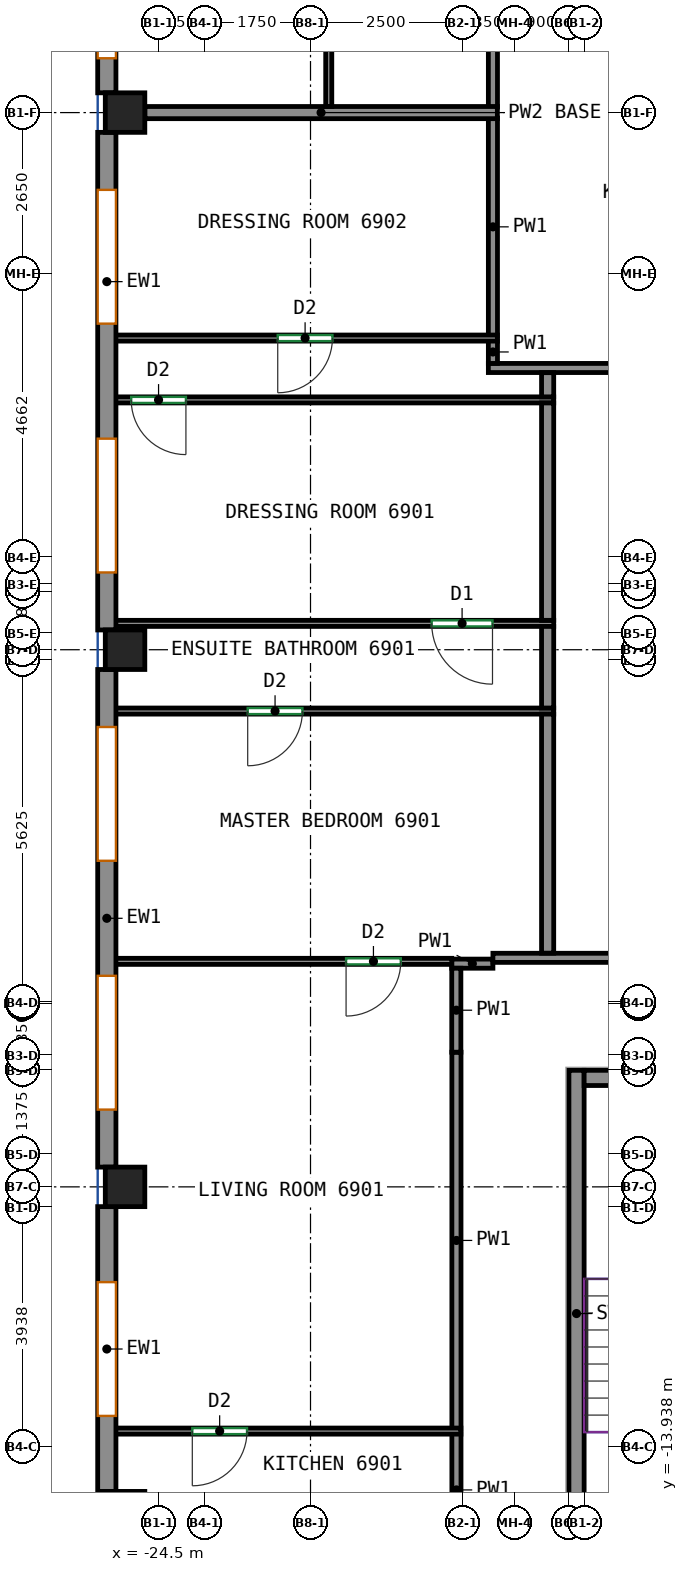
"""IFC4 building model, lengths in metres.
Left out: names, types, materials, properties, quantities, classifications, styles, units other than length and angle.
Written with IfcOpenShell. Run it as: python <this file> out.ifc"""

import sys

from ifc_helpers import new_model, si_unit, direction, frame, frame_2d, origin, origin_2d, place, context, subcontext, project, spatial, rectangle, extrude, source, transform, mapped, element, fill, save


model = new_model("IFC4")
c1 = context("Model", 3, precision=1e-05, world=origin(), true_north=direction((0.0, 1.0)))
c2 = subcontext(c1, "Body", "Model", "MODEL_VIEW")
j1 = project(units=[si_unit("LENGTHUNIT", "METRE"), si_unit("PLANEANGLEUNIT", "RADIAN")], contexts=[c1])
p1 = place(None, origin())
s1 = spatial("IfcSite", under=j1, at=p1, CompositionType="ELEMENT")
p2 = place(p1, origin())
s2 = spatial("IfcBuilding", under=s1, at=p2, CompositionType="ELEMENT")
p3 = place(p2, frame((0.0, 0.0, 280.6)))
s3 = spatial("IfcBuildingStorey", under=s2, at=p3, CompositionType="ELEMENT", Elevation=280.6)
m1 = source(origin(), c2, "Body", "SweptSolid", [
    extrude(rectangle(XDim=0.65, YDim=0.65, at=origin_2d()), origin(), (0.0, 0.0, 1.0), 3.12),
])
for number, where, z_axis, x_axis in (
    (1, (-25.05, -15.0, 0.0), (0.0, 0.0, 1.0), (1.0, 0.0, 0.0)),
    (2, (-25.05, -9.667, 0.0), (0.0, 0.0, 1.0), (1.0, 0.0, 0.0)),
    (3, (-25.05, -0.833, 0.0), (0.0, 0.0, 1.0), (1.0, 0.0, 0.0)),
    (4, (-25.05, 8.0, 0.0), (0.0, 0.0, 1.0), (1.0, 0.0, 0.0)),
):
    element("IfcColumn", number, at=place(p3, frame(where, z_axis=z_axis, x_axis=x_axis)), inside=s3, PredefinedType="COLUMN", context=c2, shape_type="MappedRepresentation", body=[
        mapped(m1, transform((0.0, 0.0, 0.0))),
    ])
m2 = source(origin(), c2, "Body", "SweptSolid", [
    extrude(rectangle(XDim=8.0, YDim=0.25, at=frame_2d((4.0, 0.0))), origin(), (0.0, 0.0, 1.0), 3.12),
])
p4 = place(p3, frame((-17.625, -15.75, 0.0), z_axis=(0.0, 0.0, 1.0), x_axis=(0.0, 1.0, 0.0)))
e5 = element("IfcWall", 5, at=p4, inside=s3, PredefinedType="SHEAR", context=c2, shape_type="MappedRepresentation", body=[
    mapped(m2, transform((0.0, 0.0, 0.0))),
])
m3 = source(origin(), c2, "Body", "SweptSolid", [
    extrude(rectangle(XDim=3.7, YDim=0.25, at=frame_2d((1.85, 0.0))), origin(), (0.0, 0.0, 1.0), 3.12),
])
p5 = place(p3, frame((-17.5, -7.875, 0.0), z_axis=(0.0, 0.0, 1.0), x_axis=(1.0, 0.0, 0.0)))
e6 = element("IfcWall", 6, at=p5, inside=s3, PredefinedType="SHEAR", context=c2, shape_type="MappedRepresentation", body=[
    mapped(m3, transform((0.0, 0.0, 0.0))),
])
m4 = source(origin(), c2, "Body", "SweptSolid", [
    extrude(rectangle(XDim=13.35, YDim=0.3, at=frame_2d((6.675, 0.0))), origin(), (0.0, 0.0, 1.0), 3.12),
])
p6 = place(p3, frame((-25.35, 21.675, 0.0), z_axis=(0.0, 0.0, 1.0), x_axis=(0.0, -1.0, 0.0)))
e7 = element("IfcWall", 7, at=p6, inside=s3, PredefinedType="SOLIDWALL", context=c2, shape_type="MappedRepresentation", body=[
    mapped(m4, transform((0.0, 0.0, 0.0))),
])
p7 = place(p6, frame((0.569, 0.0, 0.8)))
e8 = element("IfcOpeningElement", 8, at=p7, cuts=e7, PredefinedType="OPENING", context=c2, shape_type="SweptSolid", body=[
    extrude(rectangle(XDim=2.2, YDim=2.05, at=frame_2d((1.1, 1.025))), frame((0.0, 0.16, 0.0), z_axis=(0.0, -1.0, 0.0), x_axis=(1.0, 0.0, 0.0)), (0.0, 0.0, 1.0), 0.32),
])
p8 = place(p6, frame((3.906, 0.0, 0.8)))
e9 = element("IfcOpeningElement", 9, at=p8, cuts=e7, PredefinedType="OPENING", context=c2, shape_type="SweptSolid", body=[
    extrude(rectangle(XDim=2.2, YDim=2.05, at=frame_2d((1.1, 1.025))), frame((0.0, 0.16, 0.0), z_axis=(0.0, -1.0, 0.0), x_axis=(1.0, 0.0, 0.0)), (0.0, 0.0, 1.0), 0.32),
])
p9 = place(p6, frame((7.244, 0.0, 0.8)))
e10 = element("IfcOpeningElement", 10, at=p9, cuts=e7, PredefinedType="OPENING", context=c2, shape_type="SweptSolid", body=[
    extrude(rectangle(XDim=2.2, YDim=2.05, at=frame_2d((1.1, 1.025))), frame((0.0, 0.16, 0.0), z_axis=(0.0, -1.0, 0.0), x_axis=(1.0, 0.0, 0.0)), (0.0, 0.0, 1.0), 0.32),
])
p10 = place(p6, frame((10.581, 0.0, 0.8)))
e11 = element("IfcOpeningElement", 11, at=p10, cuts=e7, PredefinedType="OPENING", context=c2, shape_type="SweptSolid", body=[
    extrude(rectangle(XDim=2.2, YDim=2.05, at=frame_2d((1.1, 1.025))), frame((0.0, 0.16, 0.0), z_axis=(0.0, -1.0, 0.0), x_axis=(1.0, 0.0, 0.0)), (0.0, 0.0, 1.0), 0.32),
])
m5 = source(origin(), c2, "Body", "SweptSolid", [
    extrude(rectangle(XDim=8.183, YDim=0.3, at=frame_2d((4.092, 0.0))), origin(), (0.0, 0.0, 1.0), 3.12),
])
p11 = place(p3, frame((-25.35, 7.675, 0.0), z_axis=(0.0, 0.0, 1.0), x_axis=(0.0, -1.0, 0.0)))
e12 = element("IfcWall", 12, at=p11, inside=s3, PredefinedType="SOLIDWALL", context=c2, shape_type="MappedRepresentation", body=[
    mapped(m5, transform((0.0, 0.0, 0.0))),
])
p12 = place(p11, frame((0.946, 0.0, 0.8)))
e13 = element("IfcOpeningElement", 13, at=p12, cuts=e12, PredefinedType="OPENING", context=c2, shape_type="SweptSolid", body=[
    extrude(rectangle(XDim=2.2, YDim=2.05, at=frame_2d((1.1, 1.025))), frame((0.0, 0.16, 0.0), z_axis=(0.0, -1.0, 0.0), x_axis=(1.0, 0.0, 0.0)), (0.0, 0.0, 1.0), 0.32),
])
p13 = place(p11, frame((5.037, 0.0, 0.8)))
e14 = element("IfcOpeningElement", 14, at=p13, cuts=e12, PredefinedType="OPENING", context=c2, shape_type="SweptSolid", body=[
    extrude(rectangle(XDim=2.2, YDim=2.05, at=frame_2d((1.1, 1.025))), frame((0.0, 0.16, 0.0), z_axis=(0.0, -1.0, 0.0), x_axis=(1.0, 0.0, 0.0)), (0.0, 0.0, 1.0), 0.32),
])
m6 = source(origin(), c2, "Body", "SweptSolid", [
    extrude(rectangle(XDim=8.184, YDim=0.3, at=frame_2d((4.092, 0.0))), origin(), (0.0, 0.0, 1.0), 3.12),
])
p14 = place(p3, frame((-25.35, -1.158, 0.0), z_axis=(0.0, 0.0, 1.0), x_axis=(0.0, -1.0, 0.0)))
e15 = element("IfcWall", 15, at=p14, inside=s3, PredefinedType="SOLIDWALL", context=c2, shape_type="MappedRepresentation", body=[
    mapped(m6, transform((0.0, 0.0, 0.0))),
])
p15 = place(p14, frame((0.946, 0.0, 0.8)))
e16 = element("IfcOpeningElement", 16, at=p15, cuts=e15, PredefinedType="OPENING", context=c2, shape_type="SweptSolid", body=[
    extrude(rectangle(XDim=2.2, YDim=2.05, at=frame_2d((1.1, 1.025))), frame((0.0, 0.16, 0.0), z_axis=(0.0, -1.0, 0.0), x_axis=(1.0, 0.0, 0.0)), (0.0, 0.0, 1.0), 0.32),
])
p16 = place(p14, frame((5.038, 0.0, 0.8)))
e17 = element("IfcOpeningElement", 17, at=p16, cuts=e15, PredefinedType="OPENING", context=c2, shape_type="SweptSolid", body=[
    extrude(rectangle(XDim=2.2, YDim=2.05, at=frame_2d((1.1, 1.025))), frame((0.0, 0.16, 0.0), z_axis=(0.0, -1.0, 0.0), x_axis=(1.0, 0.0, 0.0)), (0.0, 0.0, 1.0), 0.32),
])
m7 = source(origin(), c2, "Body", "SweptSolid", [
    extrude(rectangle(XDim=4.683, YDim=0.3, at=frame_2d((2.342, 0.0))), origin(), (0.0, 0.0, 1.0), 3.12),
])
p17 = place(p3, frame((-25.35, -9.992, 0.0), z_axis=(0.0, 0.0, 1.0), x_axis=(0.0, -1.0, 0.0)))
e18 = element("IfcWall", 18, at=p17, inside=s3, PredefinedType="SOLIDWALL", context=c2, shape_type="MappedRepresentation", body=[
    mapped(m7, transform((0.0, 0.0, 0.0))),
])
p18 = place(p17, frame((1.242, 0.0, 0.8)))
e19 = element("IfcOpeningElement", 19, at=p18, cuts=e18, PredefinedType="OPENING", context=c2, shape_type="SweptSolid", body=[
    extrude(rectangle(XDim=2.2, YDim=2.05, at=frame_2d((1.1, 1.025))), frame((0.0, 0.16, 0.0), z_axis=(0.0, -1.0, 0.0), x_axis=(1.0, 0.0, 0.0)), (0.0, 0.0, 1.0), 0.32),
])
p19 = place(p3, frame((-19.6, -15.578, 0.0), z_axis=(0.0, 0.0, 1.0), x_axis=(0.0, 1.0, 0.0)))
e20 = element("IfcWall", 20, at=p19, inside=s3, PredefinedType="PARTITIONING", context=c2, shape_type="SweptSolid", body=[
    extrude(rectangle(XDim=1.855, YDim=0.15, at=frame_2d((0.927, 0.0))), origin(), (0.0, 0.0, 1.0), 3.12),
])
p20 = place(p3, frame((-19.0, -5.996, 0.0), z_axis=(0.0, 0.0, 1.0), x_axis=(-1.0, 0.0, 0.0)))
e21 = element("IfcWall", 21, at=p20, inside=s3, PredefinedType="PARTITIONING", context=c2, shape_type="SweptSolid", body=[
    extrude(rectangle(XDim=0.677, YDim=0.15, at=frame_2d((0.338, 0.0))), origin(), (0.0, 0.0, 1.0), 3.12),
])
p21 = place(p3, frame((-19.6, -13.643, 0.0), z_axis=(0.0, 0.0, 1.0), x_axis=(0.0, 1.0, 0.0)))
e22 = element("IfcWall", 22, at=p21, inside=s3, PredefinedType="PARTITIONING", context=c2, shape_type="SweptSolid", body=[
    extrude(rectangle(XDim=6.191, YDim=0.15, at=frame_2d((3.096, 0.0))), origin(), (0.0, 0.0, 1.0), 3.12),
])
p22 = place(p3, frame((-19.602, -7.452, 0.0), z_axis=(0.0, 0.0, 1.0), x_axis=(0.0, 1.0, 0.0)))
e23 = element("IfcWall", 23, at=p22, inside=s3, PredefinedType="PARTITIONING", context=c2, shape_type="SweptSolid", body=[
    extrude(rectangle(XDim=1.381, YDim=0.15, at=frame_2d((0.69, 0.0))), origin(), (0.0, 0.0, 1.0), 3.12),
])
p23 = place(p3, frame((-19.0, -5.9, 0.0), z_axis=(0.0, 0.0, 1.0), x_axis=(1.0, 0.0, 0.0)))
e24 = element("IfcWall", 24, at=p23, inside=s3, PredefinedType="PARTITIONING", context=c2, shape_type="SweptSolid", body=[
    extrude(rectangle(XDim=25.655, YDim=0.15, at=frame_2d((12.828, 0.0))), origin(), (0.0, 0.0, 1.0), 3.12),
])
p24 = place(p23, frame((4.394, 0.0, 0.0)))
e25 = element("IfcOpeningElement", 25, at=p24, cuts=e24, PredefinedType="OPENING", context=c2, shape_type="SweptSolid", body=[
    extrude(rectangle(XDim=0.9, YDim=2.1, at=frame_2d((0.45, 1.05))), frame((0.0, 0.085, 0.0), z_axis=(0.0, -1.0, 0.0), x_axis=(1.0, 0.0, 0.0)), (0.0, 0.0, 1.0), 0.17),
])
p25 = place(p3, frame((-19.075, 3.8, 0.0), z_axis=(0.0, 0.0, 1.0), x_axis=(1.0, 0.0, 0.0)))
e26 = element("IfcWall", 26, at=p25, inside=s3, PredefinedType="PARTITIONING", context=c2, shape_type="SweptSolid", body=[
    extrude(rectangle(XDim=4.89, YDim=0.15, at=frame_2d((2.445, 0.0))), origin(), (0.0, 0.0, 1.0), 3.12),
])
p26 = place(p3, frame((-19.0, 3.875, 0.0), z_axis=(0.0, 0.0, 1.0), x_axis=(0.0, 1.0, 0.0)))
e27 = element("IfcWall", 27, at=p26, inside=s3, PredefinedType="PARTITIONING", context=c2, shape_type="SweptSolid", body=[
    extrude(rectangle(XDim=0.377, YDim=0.15, at=frame_2d((0.188, 0.0))), origin(), (0.0, 0.0, 1.0), 3.12),
])
p27 = place(p3, frame((-19.0, 4.332, 0.0), z_axis=(0.0, 0.0, 1.0), x_axis=(0.0, 1.0, 0.0)))
e28 = element("IfcWall", 28, at=p27, inside=s3, PredefinedType="PARTITIONING", context=c2, shape_type="SweptSolid", body=[
    extrude(rectangle(XDim=3.578, YDim=0.15, at=frame_2d((1.789, 0.0))), origin(), (0.0, 0.0, 1.0), 3.12),
])
p28 = place(p3, frame((-19.0, 8.09, 0.0), z_axis=(0.0, 0.0, 1.0), x_axis=(0.0, 1.0, 0.0)))
e29 = element("IfcWall", 29, at=p28, inside=s3, PredefinedType="PARTITIONING", context=c2, shape_type="SweptSolid", body=[
    extrude(rectangle(XDim=9.67, YDim=0.15, at=frame_2d((4.835, 0.0))), origin(), (0.0, 0.0, 1.0), 3.12),
])
p29 = place(p28, frame((3.629, 0.0, 0.0)))
e30 = element("IfcOpeningElement", 30, at=p29, cuts=e29, PredefinedType="OPENING", context=c2, shape_type="SweptSolid", body=[
    extrude(rectangle(XDim=1.0, YDim=2.1, at=frame_2d((0.5, 1.05))), frame((0.0, 0.085, 0.0), z_axis=(0.0, -1.0, 0.0), x_axis=(1.0, 0.0, 0.0)), (0.0, 0.0, 1.0), 0.17),
])
p30 = place(p3, frame((-19.527, -13.683, 0.0), z_axis=(0.0, 0.0, 1.0), x_axis=(-1.0, 0.0, 0.0)))
e31 = element("IfcWall", 31, at=p30, inside=s3, PredefinedType="PARTITIONING", context=c2, shape_type="SweptSolid", body=[
    extrude(rectangle(XDim=5.723, YDim=0.1, at=frame_2d((2.861, 0.0))), origin(), (0.0, 0.0, 1.0), 3.12),
])
p31 = place(p30, frame((3.517, 0.0, 0.0)))
e32 = element("IfcOpeningElement", 32, at=p31, cuts=e31, PredefinedType="OPENING", context=c2, shape_type="SweptSolid", body=[
    extrude(rectangle(XDim=0.9, YDim=2.1, at=frame_2d((0.45, 1.05))), frame((0.0, 0.06, 0.0), z_axis=(0.0, -1.0, 0.0), x_axis=(1.0, 0.0, 0.0)), (0.0, 0.0, 1.0), 0.12),
])
p32 = place(p3, frame((-19.677, -5.958, 0.0), z_axis=(0.0, 0.0, 1.0), x_axis=(-1.0, 0.0, 0.0)))
e33 = element("IfcWall", 33, at=p32, inside=s3, PredefinedType="PARTITIONING", context=c2, shape_type="SweptSolid", body=[
    extrude(rectangle(XDim=5.573, YDim=0.1, at=frame_2d((2.787, 0.0))), origin(), (0.0, 0.0, 1.0), 3.12),
])
p33 = place(p32, frame((0.838, 0.0, 0.0)))
e34 = element("IfcOpeningElement", 34, at=p33, cuts=e33, PredefinedType="OPENING", context=c2, shape_type="SweptSolid", body=[
    extrude(rectangle(XDim=0.9, YDim=2.1, at=frame_2d((0.45, 1.05))), frame((0.0, 0.06, 0.0), z_axis=(0.0, -1.0, 0.0), x_axis=(1.0, 0.0, 0.0)), (0.0, 0.0, 1.0), 0.12),
])
p34 = place(p3, frame((-18.0, -1.842, 0.0), z_axis=(0.0, 0.0, 1.0), x_axis=(-1.0, 0.0, 0.0)))
e35 = element("IfcWall", 35, at=p34, inside=s3, PredefinedType="PARTITIONING", context=c2, shape_type="SweptSolid", body=[
    extrude(rectangle(XDim=7.25, YDim=0.1, at=frame_2d((3.625, 0.0))), origin(), (0.0, 0.0, 1.0), 3.12),
])
p35 = place(p34, frame((4.133, 0.0, 0.0)))
e36 = element("IfcOpeningElement", 36, at=p35, cuts=e35, PredefinedType="OPENING", context=c2, shape_type="SweptSolid", body=[
    extrude(rectangle(XDim=0.9, YDim=2.1, at=frame_2d((0.45, 1.05))), frame((0.0, 0.06, 0.0), z_axis=(0.0, -1.0, 0.0), x_axis=(1.0, 0.0, 0.0)), (0.0, 0.0, 1.0), 0.12),
])
p36 = place(p3, frame((-18.1, -5.823, 0.0), z_axis=(0.0, 0.0, 1.0), x_axis=(0.0, 1.0, 0.0)))
e37 = element("IfcWall", 37, at=p36, inside=s3, PredefinedType="PARTITIONING", context=c2, shape_type="SweptSolid", body=[
    extrude(rectangle(XDim=3.931, YDim=0.2, at=frame_2d((1.965, 0.0))), origin(), (0.0, 0.0, 1.0), 3.12),
])
p37 = place(p3, frame((-18.0, -0.4, 0.0), z_axis=(0.0, 0.0, 1.0), x_axis=(-1.0, 0.0, 0.0)))
e38 = element("IfcWall", 38, at=p37, inside=s3, PredefinedType="PARTITIONING", context=c2, shape_type="SweptSolid", body=[
    extrude(rectangle(XDim=7.25, YDim=0.1, at=frame_2d((3.625, 0.0))), origin(), (0.0, 0.0, 1.0), 3.12),
])
p38 = place(p37, frame((1.007, 0.0, 0.0)))
e39 = element("IfcOpeningElement", 39, at=p38, cuts=e38, PredefinedType="OPENING", context=c2, shape_type="SweptSolid", body=[
    extrude(rectangle(XDim=1.0, YDim=2.1, at=frame_2d((0.5, 1.05))), frame((0.0, 0.06, 0.0), z_axis=(0.0, -1.0, 0.0), x_axis=(1.0, 0.0, 0.0)), (0.0, 0.0, 1.0), 0.12),
])
p39 = place(p3, frame((-18.1, -1.792, 0.0), z_axis=(0.0, 0.0, 1.0), x_axis=(0.0, 1.0, 0.0)))
e40 = element("IfcWall", 40, at=p39, inside=s3, PredefinedType="PARTITIONING", context=c2, shape_type="SweptSolid", body=[
    extrude(rectangle(XDim=1.342, YDim=0.2, at=frame_2d((0.671, 0.0))), origin(), (0.0, 0.0, 1.0), 3.12),
])
p40 = place(p3, frame((-18.0, 3.275, 0.0), z_axis=(0.0, 0.0, 1.0), x_axis=(-1.0, 0.0, 0.0)))
e41 = element("IfcWall", 41, at=p40, inside=s3, PredefinedType="PARTITIONING", context=c2, shape_type="SweptSolid", body=[
    extrude(rectangle(XDim=7.25, YDim=0.1, at=frame_2d((3.625, 0.0))), origin(), (0.0, 0.0, 1.0), 3.12),
])
p41 = place(p40, frame((6.049, 0.0, 0.0)))
e42 = element("IfcOpeningElement", 42, at=p41, cuts=e41, PredefinedType="OPENING", context=c2, shape_type="SweptSolid", body=[
    extrude(rectangle(XDim=0.9, YDim=2.1, at=frame_2d((0.45, 1.05))), frame((0.0, 0.06, 0.0), z_axis=(0.0, -1.0, 0.0), x_axis=(1.0, 0.0, 0.0)), (0.0, 0.0, 1.0), 0.12),
])
p42 = place(p3, frame((-18.1, -0.35, 0.0), z_axis=(0.0, 0.0, 1.0), x_axis=(0.0, 1.0, 0.0)))
e43 = element("IfcWall", 43, at=p42, inside=s3, PredefinedType="PARTITIONING", context=c2, shape_type="SweptSolid", body=[
    extrude(rectangle(XDim=3.575, YDim=0.2, at=frame_2d((1.788, 0.0))), origin(), (0.0, 0.0, 1.0), 3.12),
])
p43 = place(p3, frame((-18.927, 4.292, 0.0), z_axis=(0.0, 0.0, 1.0), x_axis=(-1.0, 0.0, 0.0)))
e44 = element("IfcWall", 44, at=p43, inside=s3, PredefinedType="PARTITIONING", context=c2, shape_type="SweptSolid", body=[
    extrude(rectangle(XDim=6.323, YDim=0.1, at=frame_2d((3.162, 0.0))), origin(), (0.0, 0.0, 1.0), 3.12),
])
p44 = place(p43, frame((2.712, 0.0, 0.0)))
e45 = element("IfcOpeningElement", 45, at=p44, cuts=e44, PredefinedType="OPENING", context=c2, shape_type="SweptSolid", body=[
    extrude(rectangle(XDim=0.9, YDim=2.1, at=frame_2d((0.45, 1.05))), frame((0.0, 0.06, 0.0), z_axis=(0.0, -1.0, 0.0), x_axis=(1.0, 0.0, 0.0)), (0.0, 0.0, 1.0), 0.12),
])
p45 = place(p3, frame((-18.1, 3.325, 0.0), z_axis=(0.0, 0.0, 1.0), x_axis=(0.0, 1.0, 0.0)))
e46 = element("IfcWall", 46, at=p45, inside=s3, PredefinedType="PARTITIONING", context=c2, shape_type="SweptSolid", body=[
    extrude(rectangle(XDim=0.398, YDim=0.2, at=frame_2d((0.199, 0.0))), origin(), (0.0, 0.0, 1.0), 3.12),
])
p46 = place(p3, frame((-24.725, 8.0, 0.0), z_axis=(0.0, 0.0, 1.0), x_axis=(1.0, 0.0, 0.0)))
e47 = element("IfcWall", 47, at=p46, inside=s3, PredefinedType="PARTITIONING", context=c2, shape_type="SweptSolid", body=[
    extrude(rectangle(XDim=5.798, YDim=0.2, at=frame_2d((2.899, 0.0))), origin(), (0.0, 0.0, 1.0), 2.57),
])
p47 = place(p3, frame((-21.7, 8.1, 0.0), z_axis=(0.0, 0.0, 1.0), x_axis=(0.0, 1.0, 0.0)))
e48 = element("IfcWall", 48, at=p47, inside=s3, PredefinedType="PARTITIONING", context=c2, shape_type="SweptSolid", body=[
    extrude(rectangle(XDim=9.65, YDim=0.1, at=frame_2d((4.825, 0.0))), origin(), (0.0, 0.0, 1.0), 2.57),
])
p48 = place(p47, frame((7.041, 0.0, 0.0)))
e49 = element("IfcOpeningElement", 49, at=p48, cuts=e48, PredefinedType="OPENING", context=c2, shape_type="SweptSolid", body=[
    extrude(rectangle(XDim=1.0, YDim=2.1, at=frame_2d((0.5, 1.05))), frame((0.0, 0.06, 0.0), z_axis=(0.0, -1.0, 0.0), x_axis=(1.0, 0.0, 0.0)), (0.0, 0.0, 1.0), 0.12),
])
p49 = place(p10, origin())
e50 = element("IfcWindow", 50, at=p49, inside=s3, PartitioningType="SINGLE_PANEL", PredefinedType="WINDOW", context=c2, shape_type="SweptSolid", body=[
    extrude(rectangle(XDim=2.2, YDim=2.05, at=frame_2d((1.1, 1.025))), frame((0.0, 0.03, 0.0), z_axis=(0.0, -1.0, 0.0), x_axis=(1.0, 0.0, 0.0)), (0.0, 0.0, 1.0), 0.06),
])
fill(e11, e50)
p50 = place(p12, origin())
e51 = element("IfcWindow", 51, at=p50, inside=s3, PartitioningType="SINGLE_PANEL", PredefinedType="WINDOW", context=c2, shape_type="SweptSolid", body=[
    extrude(rectangle(XDim=2.2, YDim=2.05, at=frame_2d((1.1, 1.025))), frame((0.0, 0.03, 0.0), z_axis=(0.0, -1.0, 0.0), x_axis=(1.0, 0.0, 0.0)), (0.0, 0.0, 1.0), 0.06),
])
fill(e13, e51)
p51 = place(p13, origin())
e52 = element("IfcWindow", 52, at=p51, inside=s3, PartitioningType="SINGLE_PANEL", PredefinedType="WINDOW", context=c2, shape_type="SweptSolid", body=[
    extrude(rectangle(XDim=2.2, YDim=2.05, at=frame_2d((1.1, 1.025))), frame((0.0, 0.03, 0.0), z_axis=(0.0, -1.0, 0.0), x_axis=(1.0, 0.0, 0.0)), (0.0, 0.0, 1.0), 0.06),
])
fill(e14, e52)
p52 = place(p15, origin())
e53 = element("IfcWindow", 53, at=p52, inside=s3, PartitioningType="SINGLE_PANEL", PredefinedType="WINDOW", context=c2, shape_type="SweptSolid", body=[
    extrude(rectangle(XDim=2.2, YDim=2.05, at=frame_2d((1.1, 1.025))), frame((0.0, 0.03, 0.0), z_axis=(0.0, -1.0, 0.0), x_axis=(1.0, 0.0, 0.0)), (0.0, 0.0, 1.0), 0.06),
])
fill(e16, e53)
p53 = place(p16, origin())
e54 = element("IfcWindow", 54, at=p53, inside=s3, PartitioningType="SINGLE_PANEL", PredefinedType="WINDOW", context=c2, shape_type="SweptSolid", body=[
    extrude(rectangle(XDim=2.2, YDim=2.05, at=frame_2d((1.1, 1.025))), frame((0.0, 0.03, 0.0), z_axis=(0.0, -1.0, 0.0), x_axis=(1.0, 0.0, 0.0)), (0.0, 0.0, 1.0), 0.06),
])
fill(e17, e54)
p54 = place(p18, origin())
e55 = element("IfcWindow", 55, at=p54, inside=s3, PartitioningType="SINGLE_PANEL", PredefinedType="WINDOW", context=c2, shape_type="SweptSolid", body=[
    extrude(rectangle(XDim=2.2, YDim=2.05, at=frame_2d((1.1, 1.025))), frame((0.0, 0.03, 0.0), z_axis=(0.0, -1.0, 0.0), x_axis=(1.0, 0.0, 0.0)), (0.0, 0.0, 1.0), 0.06),
])
fill(e19, e55)
p55 = place(p31, origin())
e56 = element("IfcDoor", 56, at=p55, inside=s3, OperationType="SINGLE_SWING_RIGHT", PredefinedType="DOOR", context=c2, shape_type="SweptSolid", body=[
    extrude(rectangle(XDim=0.9, YDim=2.1, at=frame_2d((0.45, 1.05))), frame((0.0, 0.025, 0.0), z_axis=(0.0, -1.0, 0.0), x_axis=(1.0, 0.0, 0.0)), (0.0, 0.0, 1.0), 0.05),
])
fill(e32, e56)
p56 = place(p33, origin())
e57 = element("IfcDoor", 57, at=p56, inside=s3, OperationType="SINGLE_SWING_RIGHT", PredefinedType="DOOR", context=c2, shape_type="SweptSolid", body=[
    extrude(rectangle(XDim=0.9, YDim=2.1, at=frame_2d((0.45, 1.05))), frame((0.0, 0.025, 0.0), z_axis=(0.0, -1.0, 0.0), x_axis=(1.0, 0.0, 0.0)), (0.0, 0.0, 1.0), 0.05),
])
fill(e34, e57)
p57 = place(p35, origin())
e58 = element("IfcDoor", 58, at=p57, inside=s3, OperationType="SINGLE_SWING_RIGHT", PredefinedType="DOOR", context=c2, shape_type="SweptSolid", body=[
    extrude(rectangle(XDim=0.9, YDim=2.1, at=frame_2d((0.45, 1.05))), frame((0.0, 0.025, 0.0), z_axis=(0.0, -1.0, 0.0), x_axis=(1.0, 0.0, 0.0)), (0.0, 0.0, 1.0), 0.05),
])
fill(e36, e58)
p58 = place(p38, origin())
e59 = element("IfcDoor", 59, at=p58, inside=s3, OperationType="SINGLE_SWING_LEFT", PredefinedType="DOOR", context=c2, shape_type="SweptSolid", body=[
    extrude(rectangle(XDim=1.0, YDim=2.1, at=frame_2d((0.5, 1.05))), frame((0.0, 0.025, 0.0), z_axis=(0.0, -1.0, 0.0), x_axis=(1.0, 0.0, 0.0)), (0.0, 0.0, 1.0), 0.05),
])
fill(e39, e59)
p59 = place(p41, origin())
e60 = element("IfcDoor", 60, at=p59, inside=s3, OperationType="SINGLE_SWING_LEFT", PredefinedType="DOOR", context=c2, shape_type="SweptSolid", body=[
    extrude(rectangle(XDim=0.9, YDim=2.1, at=frame_2d((0.45, 1.05))), frame((0.0, 0.025, 0.0), z_axis=(0.0, -1.0, 0.0), x_axis=(1.0, 0.0, 0.0)), (0.0, 0.0, 1.0), 0.05),
])
fill(e42, e60)
p60 = place(p44, origin())
e61 = element("IfcDoor", 61, at=p60, inside=s3, OperationType="SINGLE_SWING_RIGHT", PredefinedType="DOOR", context=c2, shape_type="SweptSolid", body=[
    extrude(rectangle(XDim=0.9, YDim=2.1, at=frame_2d((0.45, 1.05))), frame((0.0, 0.025, 0.0), z_axis=(0.0, -1.0, 0.0), x_axis=(1.0, 0.0, 0.0)), (0.0, 0.0, 1.0), 0.05),
])
fill(e45, e61)
save(model, sys.argv[1])
